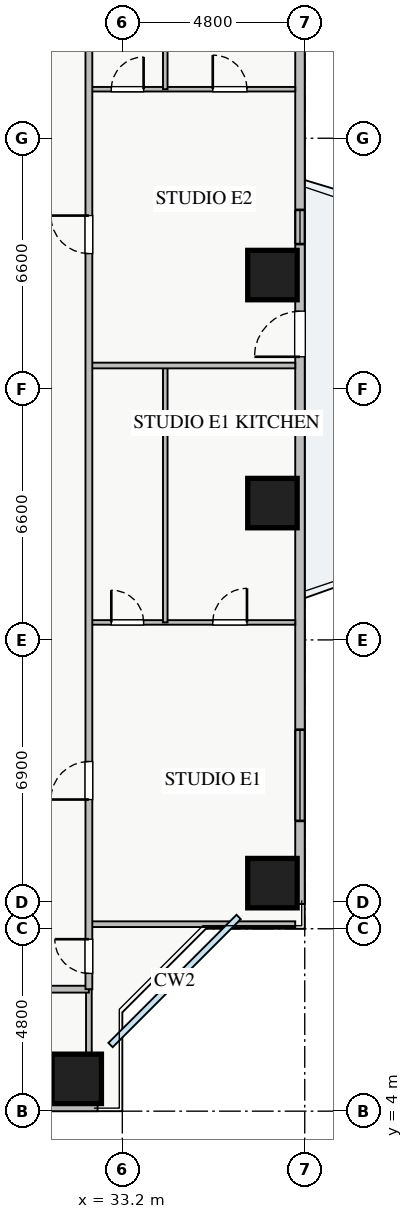
"""IFC4 building model, lengths in metres.
Left out: names, types, materials, properties, quantities, classifications, styles, units other than length and angle.
Written with IfcOpenShell. Run it as: python <this file> out.ifc"""

import sys

from ifc_helpers import new_model, si_unit, direction, frame, frame_2d, origin, origin_2d, place, context, subcontext, project, spatial, rectangle, extrude, source, transform, mapped, element, fill, save


model = new_model("IFC4")
c1 = context("Model", 3, precision=1e-05, world=origin(), true_north=direction((0.0, 1.0)))
c2 = subcontext(c1, "Body", "Model", "MODEL_VIEW")
j1 = project(units=[si_unit("LENGTHUNIT", "METRE"), si_unit("PLANEANGLEUNIT", "RADIAN")], contexts=[c1])
p1 = place(None, origin())
s1 = spatial("IfcSite", under=j1, at=p1, CompositionType="ELEMENT")
p2 = place(p1, origin())
s2 = spatial("IfcBuilding", under=s1, at=p2, CompositionType="ELEMENT")
p3 = place(p2, frame((0.0, 0.0, 76.25)))
s3 = spatial("IfcBuildingStorey", under=s2, at=p3, CompositionType="ELEMENT", Elevation=76.25)
m1 = source(origin(), c2, "Body", "SweptSolid", [
    extrude(rectangle(XDim=1.3, YDim=1.3, at=origin_2d()), origin(), (0.0, 0.0, 1.0), 3.25),
])
for number, where, z_axis, x_axis in (
    (1, (32.0, 4.85, 0.0), (0.0, 0.0, 1.0), (1.0, 0.0, 0.0)),
    (2, (37.15, 10.0, 0.0), (0.0, 0.0, 1.0), (1.0, 0.0, 0.0)),
    (3, (37.15, 20.0, 0.0), (0.0, 0.0, 1.0), (1.0, 0.0, 0.0)),
    (4, (37.15, 26.0, 0.0), (0.0, 0.0, 1.0), (1.0, 0.0, 0.0)),
):
    element("IfcColumn", number, at=place(p3, frame(where, z_axis=z_axis, x_axis=x_axis)), inside=s3, PredefinedType="COLUMN", context=c2, shape_type="MappedRepresentation", body=[
        mapped(m1, transform((0.0, 0.0, 0.0), x_axis=(1.0, 0.0, 0.0), y_axis=(0.0, 1.0, 0.0), z_axis=(0.0, 0.0, 1.0), scale=1.0)),
    ])
p4 = place(p3, frame((5.45, 4.125, 0.0), z_axis=(0.0, 0.0, 1.0), x_axis=(1.0, 0.0, 0.0)))
e5 = element("IfcWall", 5, at=p4, inside=s3, PredefinedType="STANDARD", context=c2, shape_type="SweptSolid", body=[
    extrude(rectangle(XDim=27.1, YDim=0.25, at=frame_2d((13.55, 0.0))), origin(), (0.0, 0.0, 1.0), 2.61),
])
p5 = place(p4, frame((14.4, 0.0, 0.0)))
e6 = element("IfcOpeningElement", 6, at=p5, cuts=e5, PredefinedType="OPENING", context=c2, shape_type="SweptSolid", body=[
    extrude(rectangle(XDim=1.2, YDim=2.1, at=frame_2d((0.6, 1.05))), frame((0.0, 0.135, 0.0), z_axis=(0.0, -1.0, 0.0), x_axis=(1.0, 0.0, 0.0)), (0.0, 0.0, 1.0), 0.27),
])
p6 = place(p4, frame((1.48, 0.0, 0.9)))
e7 = element("IfcOpeningElement", 7, at=p6, cuts=e5, PredefinedType="OPENING", context=c2, shape_type="SweptSolid", body=[
    extrude(rectangle(XDim=1.5, YDim=1.5, at=frame_2d((0.75, 0.75))), frame((0.0, 0.135, 0.0), z_axis=(0.0, -1.0, 0.0), x_axis=(1.0, 0.0, 0.0)), (0.0, 0.0, 1.0), 0.27),
])
p7 = place(p4, frame((9.263, 0.0, 0.9)))
e8 = element("IfcOpeningElement", 8, at=p7, cuts=e5, PredefinedType="OPENING", context=c2, shape_type="SweptSolid", body=[
    extrude(rectangle(XDim=1.8, YDim=1.45, at=frame_2d((0.9, 0.725))), frame((0.0, 0.135, 0.0), z_axis=(0.0, -1.0, 0.0), x_axis=(1.0, 0.0, 0.0)), (0.0, 0.0, 1.0), 0.27),
])
p8 = place(p4, frame((16.188, 0.0, 0.9)))
e9 = element("IfcOpeningElement", 9, at=p8, cuts=e5, PredefinedType="OPENING", context=c2, shape_type="SweptSolid", body=[
    extrude(rectangle(XDim=1.5, YDim=1.45, at=frame_2d((0.75, 0.725))), frame((0.0, 0.135, 0.0), z_axis=(0.0, -1.0, 0.0), x_axis=(1.0, 0.0, 0.0)), (0.0, 0.0, 1.0), 0.27),
])
p9 = place(p4, frame((22.663, 0.0, 0.9)))
e10 = element("IfcOpeningElement", 10, at=p9, cuts=e5, PredefinedType="OPENING", context=c2, shape_type="SweptSolid", body=[
    extrude(rectangle(XDim=2.1, YDim=1.48, at=frame_2d((1.05, 0.74))), frame((0.0, 0.135, 0.0), z_axis=(0.0, -1.0, 0.0), x_axis=(1.0, 0.0, 0.0)), (0.0, 0.0, 1.0), 0.27),
])
p10 = place(p4, frame((5.114, 0.0, 0.9)))
e11 = element("IfcOpeningElement", 11, at=p10, cuts=e5, PredefinedType="OPENING", context=c2, shape_type="SweptSolid", body=[
    extrude(rectangle(XDim=2.4, YDim=1.5, at=frame_2d((1.2, 0.75))), frame((0.0, 0.135, 0.0), z_axis=(0.0, -1.0, 0.0), x_axis=(1.0, 0.0, 0.0)), (0.0, 0.0, 1.0), 0.27),
])
p11 = place(p3, frame((37.875, 9.45, 0.0), z_axis=(0.0, 0.0, 1.0), x_axis=(0.0, 1.0, 0.0)))
e12 = element("IfcWall", 12, at=p11, inside=s3, PredefinedType="STANDARD", context=c2, shape_type="SweptSolid", body=[
    extrude(rectangle(XDim=27.1, YDim=0.25, at=frame_2d((13.55, 0.0))), origin(), (0.0, 0.0, 1.0), 2.61),
])
p12 = place(p11, frame((14.4, 0.0, 0.0)))
e13 = element("IfcOpeningElement", 13, at=p12, cuts=e12, PredefinedType="OPENING", context=c2, shape_type="SweptSolid", body=[
    extrude(rectangle(XDim=1.2, YDim=2.1, at=frame_2d((0.6, 1.05))), frame((0.0, 0.135, 0.0), z_axis=(0.0, -1.0, 0.0), x_axis=(1.0, 0.0, 0.0)), (0.0, 0.0, 1.0), 0.27),
])
p13 = place(p11, frame((2.188, 0.0, 0.9)))
e14 = element("IfcOpeningElement", 14, at=p13, cuts=e12, PredefinedType="OPENING", context=c2, shape_type="SweptSolid", body=[
    extrude(rectangle(XDim=2.4, YDim=1.48, at=frame_2d((1.2, 0.74))), frame((0.0, 0.135, 0.0), z_axis=(0.0, -1.0, 0.0), x_axis=(1.0, 0.0, 0.0)), (0.0, 0.0, 1.0), 0.27),
])
p14 = place(p11, frame((22.663, 0.0, 0.9)))
e15 = element("IfcOpeningElement", 15, at=p14, cuts=e12, PredefinedType="OPENING", context=c2, shape_type="SweptSolid", body=[
    extrude(rectangle(XDim=2.1, YDim=1.48, at=frame_2d((1.05, 0.74))), frame((0.0, 0.135, 0.0), z_axis=(0.0, -1.0, 0.0), x_axis=(1.0, 0.0, 0.0)), (0.0, 0.0, 1.0), 0.27),
])
p15 = place(p11, frame((17.365, 0.0, 0.9)))
e16 = element("IfcOpeningElement", 16, at=p15, cuts=e12, PredefinedType="OPENING", context=c2, shape_type="SweptSolid", body=[
    extrude(rectangle(XDim=0.9, YDim=1.2, at=frame_2d((0.45, 0.6))), frame((0.0, 0.135, 0.0), z_axis=(0.0, -1.0, 0.0), x_axis=(1.0, 0.0, 0.0)), (0.0, 0.0, 1.0), 0.27),
])
p16 = place(p3, frame((32.32, 4.25, 0.0), z_axis=(0.0, 0.0, 1.0), x_axis=(0.0, 1.0, 0.0)))
e17 = element("IfcWall", 17, at=p16, inside=s3, PredefinedType="PARTITIONING", context=c2, shape_type="SweptSolid", body=[
    extrude(rectangle(XDim=2.96, YDim=0.15, at=frame_2d((1.48, 0.0))), origin(), (0.0, 0.0, 1.0), 3.07),
])
p17 = place(p3, frame((8.78, 7.21, 0.0), z_axis=(0.0, 0.0, 1.0), x_axis=(1.0, 0.0, 0.0)))
e18 = element("IfcWall", 18, at=p17, inside=s3, PredefinedType="PARTITIONING", context=c2, shape_type="SweptSolid", body=[
    extrude(rectangle(XDim=23.54, YDim=0.18, at=frame_2d((11.77, 0.0))), origin(), (0.0, 0.0, 1.0), 3.07),
])
p18 = place(p17, frame((4.66, 0.0, 0.0)))
e19 = element("IfcOpeningElement", 19, at=p18, cuts=e18, PredefinedType="OPENING", context=c2, shape_type="SweptSolid", body=[
    extrude(rectangle(XDim=1.0, YDim=2.05, at=frame_2d((0.5, 1.025))), frame((0.0, 0.1, 0.0), z_axis=(0.0, -1.0, 0.0), x_axis=(1.0, 0.0, 0.0)), (0.0, 0.0, 1.0), 0.2),
])
p19 = place(p17, frame((16.43, 0.0, 0.0)))
e20 = element("IfcOpeningElement", 20, at=p19, cuts=e18, PredefinedType="OPENING", context=c2, shape_type="SweptSolid", body=[
    extrude(rectangle(XDim=1.0, YDim=2.05, at=frame_2d((0.5, 1.025))), frame((0.0, 0.1, 0.0), z_axis=(0.0, -1.0, 0.0), x_axis=(1.0, 0.0, 0.0)), (0.0, 0.0, 1.0), 0.2),
])
p20 = place(p3, frame((32.32, 8.92, 0.0), z_axis=(0.0, 0.0, 1.0), x_axis=(1.0, 0.0, 0.0)))
e21 = element("IfcWall", 21, at=p20, inside=s3, PredefinedType="PARTITIONING", context=c2, shape_type="SweptSolid", body=[
    extrude(rectangle(XDim=5.43, YDim=0.15, at=frame_2d((2.715, 0.0))), origin(), (0.0, 0.0, 1.0), 3.07),
])
p21 = place(p3, frame((32.32, 16.86, 0.0), z_axis=(0.0, 0.0, 1.0), x_axis=(1.0, 0.0, 0.0)))
e22 = element("IfcWall", 22, at=p21, inside=s3, PredefinedType="PLUMBINGWALL", context=c2, shape_type="SweptSolid", body=[
    extrude(rectangle(XDim=5.43, YDim=0.12, at=frame_2d((2.715, 0.0))), origin(), (0.0, 0.0, 1.0), 3.07),
])
p22 = place(p21, frame((0.59, 0.0, 0.0)))
e23 = element("IfcOpeningElement", 23, at=p22, cuts=e22, PredefinedType="OPENING", context=c2, shape_type="SweptSolid", body=[
    extrude(rectangle(XDim=0.85, YDim=2.05, at=frame_2d((0.425, 1.025))), frame((0.0, 0.07, 0.0), z_axis=(0.0, -1.0, 0.0), x_axis=(1.0, 0.0, 0.0)), (0.0, 0.0, 1.0), 0.14),
])
p23 = place(p21, frame((3.26, 0.0, 0.0)))
e24 = element("IfcOpeningElement", 24, at=p23, cuts=e22, PredefinedType="OPENING", context=c2, shape_type="SweptSolid", body=[
    extrude(rectangle(XDim=0.9, YDim=2.05, at=frame_2d((0.45, 1.025))), frame((0.0, 0.07, 0.0), z_axis=(0.0, -1.0, 0.0), x_axis=(1.0, 0.0, 0.0)), (0.0, 0.0, 1.0), 0.14),
])
p24 = place(p3, frame((34.33, 16.86, 0.0), z_axis=(0.0, 0.0, 1.0), x_axis=(0.0, 1.0, 0.0)))
e25 = element("IfcWall", 25, at=p24, inside=s3, PredefinedType="PLUMBINGWALL", context=c2, shape_type="SweptSolid", body=[
    extrude(rectangle(XDim=6.76, YDim=0.12, at=frame_2d((3.38, 0.0))), origin(), (0.0, 0.0, 1.0), 3.07),
])
p25 = place(p3, frame((32.32, 30.89, 0.0), z_axis=(0.0, 0.0, 1.0), x_axis=(1.0, 0.0, 0.0)))
e26 = element("IfcWall", 26, at=p25, inside=s3, PredefinedType="PLUMBINGWALL", context=c2, shape_type="SweptSolid", body=[
    extrude(rectangle(XDim=5.43, YDim=0.12, at=frame_2d((2.715, 0.0))), origin(), (0.0, 0.0, 1.0), 3.07),
])
p26 = place(p25, frame((0.59, 0.0, 0.0)))
e27 = element("IfcOpeningElement", 27, at=p26, cuts=e26, PredefinedType="OPENING", context=c2, shape_type="SweptSolid", body=[
    extrude(rectangle(XDim=0.85, YDim=2.05, at=frame_2d((0.425, 1.025))), frame((0.0, 0.07, 0.0), z_axis=(0.0, -1.0, 0.0), x_axis=(1.0, 0.0, 0.0)), (0.0, 0.0, 1.0), 0.14),
])
p27 = place(p25, frame((3.26, 0.0, 0.0)))
e28 = element("IfcOpeningElement", 28, at=p27, cuts=e26, PredefinedType="OPENING", context=c2, shape_type="SweptSolid", body=[
    extrude(rectangle(XDim=0.9, YDim=2.05, at=frame_2d((0.45, 1.025))), frame((0.0, 0.07, 0.0), z_axis=(0.0, -1.0, 0.0), x_axis=(1.0, 0.0, 0.0)), (0.0, 0.0, 1.0), 0.14),
])
p28 = place(p3, frame((34.33, 30.89, 0.0), z_axis=(0.0, 0.0, 1.0), x_axis=(0.0, 1.0, 0.0)))
e29 = element("IfcWall", 29, at=p28, inside=s3, PredefinedType="PLUMBINGWALL", context=c2, shape_type="SweptSolid", body=[
    extrude(rectangle(XDim=6.19, YDim=0.12, at=frame_2d((3.095, 0.0))), origin(), (0.0, 0.0, 1.0), 3.07),
])
p29 = place(p3, frame((32.32, 23.62, 0.0), z_axis=(0.0, 0.0, 1.0), x_axis=(1.0, 0.0, 0.0)))
e30 = element("IfcWall", 30, at=p29, inside=s3, PredefinedType="PARTITIONING", context=c2, shape_type="SweptSolid", body=[
    extrude(rectangle(XDim=5.43, YDim=0.15, at=frame_2d((2.715, 0.0))), origin(), (0.0, 0.0, 1.0), 3.07),
])
p30 = place(p3, frame((32.32, 7.21, 0.0), z_axis=(0.0, 0.0, 1.0), x_axis=(0.0, 1.0, 0.0)))
e31 = element("IfcWall", 31, at=p30, inside=s3, PredefinedType="PARTITIONING", context=c2, shape_type="SweptSolid", body=[
    extrude(rectangle(XDim=31.23, YDim=0.18, at=frame_2d((15.615, 0.0))), origin(), (0.0, 0.0, 1.0), 2.815),
])
p31 = place(p30, frame((30.09, 0.0, 0.0)))
e32 = element("IfcOpeningElement", 32, at=p31, cuts=e31, PredefinedType="OPENING", context=c2, shape_type="SweptSolid", body=[
    extrude(rectangle(XDim=0.9, YDim=2.05, at=frame_2d((0.45, 1.025))), frame((0.0, 0.1, 0.0), z_axis=(0.0, -1.0, 0.0), x_axis=(1.0, 0.0, 0.0)), (0.0, 0.0, 1.0), 0.2),
])
p32 = place(p30, frame((0.415, 0.0, 0.0)))
e33 = element("IfcOpeningElement", 33, at=p32, cuts=e31, PredefinedType="OPENING", context=c2, shape_type="SweptSolid", body=[
    extrude(rectangle(XDim=0.9, YDim=2.05, at=frame_2d((0.45, 1.025))), frame((0.0, 0.1, 0.0), z_axis=(0.0, -1.0, 0.0), x_axis=(1.0, 0.0, 0.0)), (0.0, 0.0, 1.0), 0.2),
])
p33 = place(p30, frame((4.99, 0.0, 0.0)))
e34 = element("IfcOpeningElement", 34, at=p33, cuts=e31, PredefinedType="OPENING", context=c2, shape_type="SweptSolid", body=[
    extrude(rectangle(XDim=1.0, YDim=2.05, at=frame_2d((0.5, 1.025))), frame((0.0, 0.1, 0.0), z_axis=(0.0, -1.0, 0.0), x_axis=(1.0, 0.0, 0.0)), (0.0, 0.0, 1.0), 0.2),
])
p34 = place(p30, frame((19.355, 0.0, 0.0)))
e35 = element("IfcOpeningElement", 35, at=p34, cuts=e31, PredefinedType="OPENING", context=c2, shape_type="SweptSolid", body=[
    extrude(rectangle(XDim=1.0, YDim=2.05, at=frame_2d((0.5, 1.025))), frame((0.0, 0.1, 0.0), z_axis=(0.0, -1.0, 0.0), x_axis=(1.0, 0.0, 0.0)), (0.0, 0.0, 1.0), 0.2),
])
m2 = source(origin(), c2, "Body", "SweptSolid", [
    extrude(rectangle(XDim=1.2, YDim=2.1, at=frame_2d((0.6, 1.05))), frame((0.0, 0.025, 0.0), z_axis=(0.0, -1.0, 0.0), x_axis=(1.0, 0.0, 0.0)), (0.0, 0.0, 1.0), 0.05),
])
p35 = place(p12, origin())
e36 = element("IfcDoor", 36, at=p35, inside=s3, OperationType="SINGLE_SWING_LEFT", PredefinedType="DOOR", context=c2, shape_type="MappedRepresentation", body=[
    mapped(m2, transform((0.0, 0.0, 0.0), x_axis=(1.0, 0.0, 0.0), y_axis=(0.0, 1.0, 0.0), z_axis=(0.0, 0.0, 1.0), scale=1.0)),
])
fill(e13, e36)
m3 = source(origin(), c2, "Body", "SweptSolid", [
    extrude(rectangle(XDim=2.4, YDim=1.48, at=frame_2d((1.2, 0.74))), frame((0.0, 0.03, 0.0), z_axis=(0.0, -1.0, 0.0), x_axis=(1.0, 0.0, 0.0)), (0.0, 0.0, 1.0), 0.06),
])
p36 = place(p13, origin())
e37 = element("IfcWindow", 37, at=p36, inside=s3, PartitioningType="TRIPLE_PANEL_VERTICAL", PredefinedType="WINDOW", context=c2, shape_type="MappedRepresentation", body=[
    mapped(m3, transform((0.0, 0.0, 0.0), x_axis=(1.0, 0.0, 0.0), y_axis=(0.0, 1.0, 0.0), z_axis=(0.0, 0.0, 1.0), scale=1.0)),
])
fill(e14, e37)
m4 = source(origin(), c2, "Body", "SweptSolid", [
    extrude(rectangle(XDim=0.85, YDim=2.05, at=frame_2d((0.425, 1.025))), frame((0.0, 0.025, 0.0), z_axis=(0.0, -1.0, 0.0), x_axis=(1.0, 0.0, 0.0)), (0.0, 0.0, 1.0), 0.05),
])
p37 = place(p22, origin())
e38 = element("IfcDoor", 38, at=p37, inside=s3, OperationType="SINGLE_SWING_LEFT", PredefinedType="DOOR", context=c2, shape_type="MappedRepresentation", body=[
    mapped(m4, transform((0.0, 0.0, 0.0), x_axis=(1.0, 0.0, 0.0), y_axis=(0.0, 1.0, 0.0), z_axis=(0.0, 0.0, 1.0), scale=1.0)),
])
fill(e23, e38)
m5 = source(origin(), c2, "Body", "SweptSolid", [
    extrude(rectangle(XDim=0.9, YDim=2.05, at=frame_2d((0.45, 1.025))), frame((0.0, 0.025, 0.0), z_axis=(0.0, -1.0, 0.0), x_axis=(1.0, 0.0, 0.0)), (0.0, 0.0, 1.0), 0.05),
])
p38 = place(p23, origin())
e39 = element("IfcDoor", 39, at=p38, inside=s3, OperationType="SINGLE_SWING_RIGHT", PredefinedType="DOOR", context=c2, shape_type="MappedRepresentation", body=[
    mapped(m5, transform((0.0, 0.0, 0.0), x_axis=(1.0, 0.0, 0.0), y_axis=(0.0, 1.0, 0.0), z_axis=(0.0, 0.0, 1.0), scale=1.0)),
])
fill(e24, e39)
p39 = place(p26, origin())
e40 = element("IfcDoor", 40, at=p39, inside=s3, OperationType="SINGLE_SWING_RIGHT", PredefinedType="DOOR", context=c2, shape_type="MappedRepresentation", body=[
    mapped(m4, transform((0.0, 0.0, 0.0), x_axis=(1.0, 0.0, 0.0), y_axis=(0.0, 1.0, 0.0), z_axis=(0.0, 0.0, 1.0), scale=1.0)),
])
fill(e27, e40)
p40 = place(p27, origin())
e41 = element("IfcDoor", 41, at=p40, inside=s3, OperationType="SINGLE_SWING_LEFT", PredefinedType="DOOR", context=c2, shape_type="MappedRepresentation", body=[
    mapped(m5, transform((0.0, 0.0, 0.0), x_axis=(1.0, 0.0, 0.0), y_axis=(0.0, 1.0, 0.0), z_axis=(0.0, 0.0, 1.0), scale=1.0)),
])
fill(e28, e41)
p41 = place(p32, origin())
e42 = element("IfcDoor", 42, at=p41, inside=s3, OperationType="SINGLE_SWING_RIGHT", PredefinedType="DOOR", context=c2, shape_type="MappedRepresentation", body=[
    mapped(m5, transform((0.0, 0.0, 0.0), x_axis=(1.0, 0.0, 0.0), y_axis=(0.0, 1.0, 0.0), z_axis=(0.0, 0.0, 1.0), scale=1.0)),
])
fill(e33, e42)
m6 = source(origin(), c2, "Body", "SweptSolid", [
    extrude(rectangle(XDim=1.0, YDim=2.05, at=frame_2d((0.5, 1.025))), frame((0.0, 0.025, 0.0), z_axis=(0.0, -1.0, 0.0), x_axis=(1.0, 0.0, 0.0)), (0.0, 0.0, 1.0), 0.05),
])
p42 = place(p33, origin())
e43 = element("IfcDoor", 43, at=p42, inside=s3, OperationType="SINGLE_SWING_LEFT", PredefinedType="DOOR", context=c2, shape_type="MappedRepresentation", body=[
    mapped(m6, transform((0.0, 0.0, 0.0), x_axis=(1.0, 0.0, 0.0), y_axis=(0.0, 1.0, 0.0), z_axis=(0.0, 0.0, 1.0), scale=1.0)),
])
fill(e34, e43)
p43 = place(p34, origin())
e44 = element("IfcDoor", 44, at=p43, inside=s3, OperationType="SINGLE_SWING_RIGHT", PredefinedType="DOOR", context=c2, shape_type="MappedRepresentation", body=[
    mapped(m6, transform((0.0, 0.0, 0.0), x_axis=(1.0, 0.0, 0.0), y_axis=(0.0, 1.0, 0.0), z_axis=(0.0, 0.0, 1.0), scale=1.0)),
])
fill(e35, e44)
m7 = source(origin(), c2, "Body", "SweptSolid", [
    extrude(rectangle(XDim=0.9, YDim=1.2, at=frame_2d((0.45, 0.6))), frame((0.0, 0.03, 0.0), z_axis=(0.0, -1.0, 0.0), x_axis=(1.0, 0.0, 0.0)), (0.0, 0.0, 1.0), 0.06),
])
p44 = place(p15, origin())
e45 = element("IfcWindow", 45, at=p44, inside=s3, PartitioningType="SINGLE_PANEL", PredefinedType="WINDOW", context=c2, shape_type="MappedRepresentation", body=[
    mapped(m7, transform((0.0, 0.0, 0.0), x_axis=(1.0, 0.0, 0.0), y_axis=(0.0, 1.0, 0.0), z_axis=(0.0, 0.0, 1.0), scale=1.0)),
])
fill(e16, e45)
save(model, sys.argv[1])
